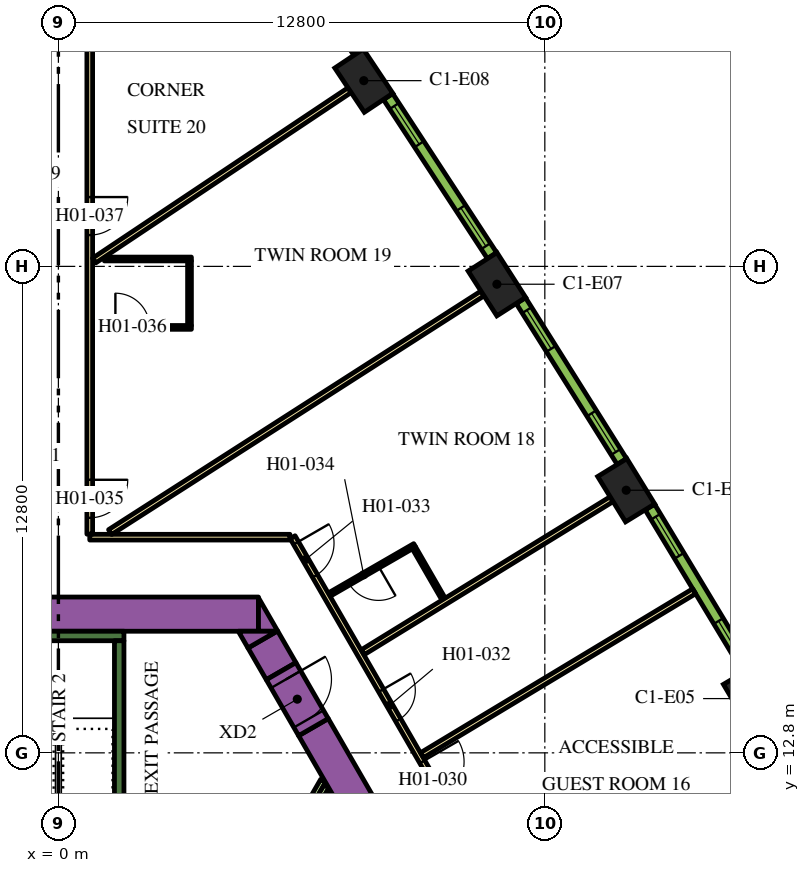
"""IFC4 building model, lengths in metres.
Left out: names, types, materials, properties, quantities, classifications, styles, units other than length and angle.
Written with IfcOpenShell. Run it as: python <this file> out.ifc"""

import sys

from ifc_helpers import new_model, si_unit, direction, frame, frame_2d, origin, origin_2d, place, context, subcontext, project, spatial, polyline, rectangle, outline, extrude, element, fill, save


model = new_model("IFC4")
c1 = context("Model", 3, precision=1e-05, world=origin(), true_north=direction((0.0, 1.0)))
c2 = subcontext(c1, "Body", "Model", "MODEL_VIEW")
j1 = project(units=[si_unit("LENGTHUNIT", "METRE"), si_unit("PLANEANGLEUNIT", "RADIAN")], contexts=[c1])
p1 = place(None, origin())
s1 = spatial("IfcSite", under=j1, at=p1, CompositionType="ELEMENT")
p2 = place(p1, origin())
s2 = spatial("IfcBuilding", under=s1, at=p2, CompositionType="ELEMENT")
p3 = place(p2, frame((0.0, 0.0, 31.5)))
s3 = spatial("IfcBuildingStorey", under=s2, at=p3, CompositionType="ELEMENT", Elevation=31.5)
for number, where, z_axis, x_axis in (
    (1, (18.243, 14.228, 0.0), (0.0, 0.0, 1.0), (-0.508, 0.861, 0.0)),
    (2, (14.942, 19.71, 0.0), (0.0, 0.0, 1.0), (-0.524, 0.852, 0.0)),
    (3, (11.539, 25.131, 0.0), (0.0, 0.0, 1.0), (-0.539, 0.842, 0.0)),
    (4, (8.037, 30.487, 0.0), (0.0, 0.0, 1.0), (-0.555, 0.832, 0.0)),
):
    element("IfcColumn", number, at=place(p3, frame(where, z_axis=z_axis, x_axis=x_axis)), inside=s3, PredefinedType="COLUMN", context=c2, shape_type="SweptSolid", body=[
        extrude(rectangle(XDim=1.4, YDim=0.9, at=origin_2d()), origin(), (0.0, 0.0, 1.0), 3.9),
    ])
p4 = place(p3, frame((6.711, 13.476, 0.0), z_axis=(0.0, 0.0, 1.0), x_axis=(0.500002723396, -0.866023831425, 0.0)))
e5 = element("IfcWall", 5, at=p4, inside=s3, PredefinedType="SOLIDWALL", context=c2, shape_type="SweptSolid", body=[
    extrude(rectangle(XDim=20.334, YDim=0.9, at=frame_2d((10.167, 0.0))), origin(), (0.0, 0.0, 1.0), 3.9),
])
p5 = place(p3, frame((-4.224, 16.45, 0.0), z_axis=(0.0, 0.0, 1.0), x_axis=(1.0, 0.0, 0.0)))
e6 = element("IfcWall", 6, at=p5, inside=s3, PredefinedType="SOLIDWALL", context=c2, shape_type="SweptSolid", body=[
    extrude(rectangle(XDim=9.488, YDim=0.9, at=frame_2d((4.744, 0.0))), origin(), (0.0, 0.0, 1.0), 3.9),
])
p6 = place(p3, origin())
e7 = element("IfcWall", 7, at=p6, inside=s3, PredefinedType="SOLIDWALL", context=c2, shape_type="SweptSolid", body=[
    extrude(outline(polyline([(5.265, 16.0), (5.265, 16.88), (5.773, 16.0), (5.265, 16.0)])), origin(), (0.0, 0.0, 1.0), 3.9),
])
p7 = place(p3, frame((5.861, 14.949, 0.0), z_axis=(0.0, 0.0, 1.0), x_axis=(-0.50011719232, 0.865957732194, 0.0)))
e8 = element("IfcWall", 8, at=p7, inside=s3, PredefinedType="SOLIDWALL", context=c2, shape_type="SweptSolid", body=[
    extrude(rectangle(XDim=0.964, YDim=0.9, at=frame_2d((0.482, 0.0))), origin(), (0.0, 0.0, 1.0), 3.9),
])
e9 = element("IfcWall", 9, at=p6, inside=s3, PredefinedType="SOLIDWALL", context=c2, shape_type="SweptSolid", body=[
    extrude(outline(polyline([(4.734, 16.0), (5.75, 16.0), (4.988, 15.56), (4.734, 16.0)])), origin(), (0.0, 0.0, 1.0), 3.9),
])
p8 = place(p3, frame((-1.725, 15.875, 0.0), z_axis=(0.0, 0.0, 1.0), x_axis=(1.0, 0.0, 0.0)))
e10 = element("IfcWall", 10, at=p8, inside=s3, PredefinedType="SOLIDWALL", context=c2, shape_type="SweptSolid", body=[
    extrude(rectangle(XDim=3.45, YDim=0.25, at=frame_2d((1.725, 0.0))), origin(), (0.0, 0.0, 1.0), 3.9),
])
p9 = place(p3, frame((1.6, 8.95, 0.0), z_axis=(0.0, 0.0, 1.0), x_axis=(0.0, 1.0, 0.0)))
e11 = element("IfcWall", 11, at=p9, inside=s3, PredefinedType="SOLIDWALL", context=c2, shape_type="SweptSolid", body=[
    extrude(rectangle(XDim=6.8, YDim=0.25, at=frame_2d((3.4, 0.0))), origin(), (0.0, 0.0, 1.0), 3.9),
])
p10 = place(p3, frame((6.482, 11.225, 0.0), z_axis=(0.0, 0.0, 1.0), x_axis=(0.5001061818, 0.865964091014, 0.0)))
e12 = element("IfcWall", 12, at=p10, inside=s3, PredefinedType="PARTITIONING", context=c2, shape_type="SweptSolid", body=[
    extrude(rectangle(XDim=0.973, YDim=0.15, at=frame_2d((0.486, 0.0))), origin(), (0.0, 0.0, 1.0), 2.75),
])
p11 = place(p3, frame((6.742, 11.375, 0.0), z_axis=(0.0, 0.0, 1.0), x_axis=(0.499744951064, 0.86617260629, 0.0)))
e13 = element("IfcWall", 13, at=p11, inside=s3, PredefinedType="PARTITIONING", context=c2, shape_type="SweptSolid", body=[
    extrude(rectangle(XDim=0.626, YDim=0.15, at=frame_2d((0.313, 0.0))), origin(), (0.0, 0.0, 1.0), 2.75),
])
p12 = place(p3, frame((7.001, 11.525, 0.0), z_axis=(0.0, 0.0, 1.0), x_axis=(0.499797962495, 0.866142018774, 0.0)))
e14 = element("IfcWall", 14, at=p12, inside=s3, PredefinedType="PARTITIONING", context=c2, shape_type="SweptSolid", body=[
    extrude(rectangle(XDim=0.28, YDim=0.15, at=frame_2d((0.14, 0.0))), origin(), (0.0, 0.0, 1.0), 2.75),
])
p13 = place(p3, frame((5.861, 14.948, 0.0), z_axis=(0.0, 0.0, 1.0), x_axis=(0.500062241894, -0.865989465428, 0.0)))
e15 = element("IfcWall", 15, at=p13, inside=s3, PredefinedType="SOLIDWALL", context=c2, shape_type="SweptSolid", body=[
    extrude(rectangle(XDim=1.7, YDim=0.9, at=frame_2d((0.85, 0.0))), origin(), (0.0, 0.0, 1.0), 3.9),
])
p14 = place(p13, frame((0.25, 0.0, 0.0)))
e16 = element("IfcOpeningElement", 16, at=p14, cuts=e15, PredefinedType="OPENING", context=c2, shape_type="SweptSolid", body=[
    extrude(rectangle(XDim=1.2, YDim=2.1, at=frame_2d((0.6, 1.05))), frame((0.0, 0.46, 0.0), z_axis=(0.0, -1.0, 0.0), x_axis=(1.0, 0.0, 0.0)), (0.0, 0.0, 1.0), 0.92),
])
p15 = place(p3, frame((6.163, 18.475, 0.0), z_axis=(0.0, 0.0, 1.0), x_axis=(0.500001317485, -0.866024643133, 0.0)))
e17 = element("IfcWall", 17, at=p15, inside=s3, PredefinedType="PARTITIONING", context=c2, shape_type="SweptSolid", body=[
    extrude(rectangle(XDim=25.767, YDim=0.15, at=frame_2d((12.883, 0.0))), origin(), (0.0, 0.0, 1.0), 2.75),
])
p16 = place(p15, frame((24.586, 0.0, 0.0)))
e18 = element("IfcOpeningElement", 18, at=p16, cuts=e17, PredefinedType="OPENING", context=c2, shape_type="SweptSolid", body=[
    extrude(rectangle(XDim=1.0, YDim=2.1, at=frame_2d((0.5, 1.05))), frame((0.0, 0.085, 0.0), z_axis=(0.0, -1.0, 0.0), x_axis=(1.0, 0.0, 0.0)), (0.0, 0.0, 1.0), 0.17),
])
p17 = place(p15, frame((19.319, 0.0, 0.0)))
e19 = element("IfcOpeningElement", 19, at=p17, cuts=e17, PredefinedType="OPENING", context=c2, shape_type="SweptSolid", body=[
    extrude(rectangle(XDim=1.0, YDim=2.1, at=frame_2d((0.5, 1.05))), frame((0.0, 0.085, 0.0), z_axis=(0.0, -1.0, 0.0), x_axis=(1.0, 0.0, 0.0)), (0.0, 0.0, 1.0), 0.17),
])
p18 = place(p15, frame((18.012, 0.0, 0.0)))
e20 = element("IfcOpeningElement", 20, at=p18, cuts=e17, PredefinedType="OPENING", context=c2, shape_type="SweptSolid", body=[
    extrude(rectangle(XDim=1.0, YDim=2.1, at=frame_2d((0.5, 1.05))), frame((0.0, 0.085, 0.0), z_axis=(0.0, -1.0, 0.0), x_axis=(1.0, 0.0, 0.0)), (0.0, 0.0, 1.0), 0.17),
])
p19 = place(p15, frame((6.824, 0.0, 0.0)))
e21 = element("IfcOpeningElement", 21, at=p19, cuts=e17, PredefinedType="OPENING", context=c2, shape_type="SweptSolid", body=[
    extrude(rectangle(XDim=1.1, YDim=2.1, at=frame_2d((0.55, 1.05))), frame((0.0, 0.085, 0.0), z_axis=(0.0, -1.0, 0.0), x_axis=(1.0, 0.0, 0.0)), (0.0, 0.0, 1.0), 0.17),
])
p20 = place(p15, frame((4.658, 0.0, 0.0)))
e22 = element("IfcOpeningElement", 22, at=p20, cuts=e17, PredefinedType="OPENING", context=c2, shape_type="SweptSolid", body=[
    extrude(rectangle(XDim=0.9, YDim=2.1, at=frame_2d((0.45, 1.05))), frame((0.0, 0.085, 0.0), z_axis=(0.0, -1.0, 0.0), x_axis=(1.0, 0.0, 0.0)), (0.0, 0.0, 1.0), 0.17),
])
p21 = place(p15, frame((0.18, 0.0, 0.0)))
e23 = element("IfcOpeningElement", 23, at=p21, cuts=e17, PredefinedType="OPENING", context=c2, shape_type="SweptSolid", body=[
    extrude(rectangle(XDim=1.0, YDim=2.1, at=frame_2d((0.5, 1.05))), frame((0.0, 0.085, 0.0), z_axis=(0.0, -1.0, 0.0), x_axis=(1.0, 0.0, 0.0)), (0.0, 0.0, 1.0), 0.17),
])
p22 = place(p3, frame((0.825, 18.475, 0.0), z_axis=(0.0, 0.0, 1.0), x_axis=(1.0, 0.0, 0.0)))
e24 = element("IfcWall", 24, at=p22, inside=s3, PredefinedType="PARTITIONING", context=c2, shape_type="SweptSolid", body=[
    extrude(rectangle(XDim=5.268, YDim=0.15, at=frame_2d((2.634, 0.0))), origin(), (0.0, 0.0, 1.0), 2.75),
])
p23 = place(p3, frame((0.825, 34.699, 0.0), z_axis=(0.0, 0.0, 1.0), x_axis=(0.0, -1.0, 0.0)))
e25 = element("IfcWall", 25, at=p23, inside=s3, PredefinedType="PARTITIONING", context=c2, shape_type="SweptSolid", body=[
    extrude(rectangle(XDim=16.144, YDim=0.15, at=frame_2d((8.072, 0.0))), origin(), (0.0, 0.0, 1.0), 2.75),
])
p24 = place(p23, frame((14.714, 0.0, 0.0)))
e26 = element("IfcOpeningElement", 26, at=p24, cuts=e25, PredefinedType="OPENING", context=c2, shape_type="SweptSolid", body=[
    extrude(rectangle(XDim=1.0, YDim=2.1, at=frame_2d((0.5, 1.05))), frame((0.0, 0.085, 0.0), z_axis=(0.0, -1.0, 0.0), x_axis=(1.0, 0.0, 0.0)), (0.0, 0.0, 1.0), 0.17),
])
p25 = place(p23, frame((7.275, 0.0, 0.0)))
e27 = element("IfcOpeningElement", 27, at=p25, cuts=e25, PredefinedType="OPENING", context=c2, shape_type="SweptSolid", body=[
    extrude(rectangle(XDim=1.0, YDim=2.1, at=frame_2d((0.5, 1.05))), frame((0.0, 0.085, 0.0), z_axis=(0.0, -1.0, 0.0), x_axis=(1.0, 0.0, 0.0)), (0.0, 0.0, 1.0), 0.17),
])
p26 = place(p3, frame((7.662, 30.238, 0.0), z_axis=(0.0, 0.0, 1.0), x_axis=(-0.831882886825, -0.554951225431, 0.0)))
e28 = element("IfcWall", 28, at=p26, inside=s3, PredefinedType="PARTITIONING", context=c2, shape_type="SweptSolid", body=[
    extrude(rectangle(XDim=8.079, YDim=0.15, at=frame_2d((4.04, 0.0))), origin(), (0.0, 0.0, 1.0), 2.75),
])
p27 = place(p3, frame((11.16, 24.888, 0.0), z_axis=(0.0, 0.0, 1.0), x_axis=(-0.84199813156, -0.539480441211, 0.0)))
e29 = element("IfcWall", 29, at=p27, inside=s3, PredefinedType="PARTITIONING", context=c2, shape_type="SweptSolid", body=[
    extrude(rectangle(XDim=11.638, YDim=0.15, at=frame_2d((5.819, 0.0))), origin(), (0.0, 0.0, 1.0), 2.75),
])
p28 = place(p3, frame((14.558, 19.475, 0.0), z_axis=(0.0, 0.0, 1.0), x_axis=(-0.851829455142, -0.523819223925, 0.0)))
e30 = element("IfcWall", 30, at=p28, inside=s3, PredefinedType="PARTITIONING", context=c2, shape_type="SweptSolid", body=[
    extrude(rectangle(XDim=7.688, YDim=0.15, at=frame_2d((3.844, 0.0))), origin(), (0.0, 0.0, 1.0), 2.75),
])
p29 = place(p3, frame((16.729, 17.052, 0.0), z_axis=(0.0, 0.0, 1.0), x_axis=(-0.856630606266, -0.515930232113, 0.0)))
e31 = element("IfcWall", 31, at=p29, inside=s3, PredefinedType="PARTITIONING", context=c2, shape_type="SweptSolid", body=[
    extrude(rectangle(XDim=8.355, YDim=0.15, at=frame_2d((4.178, 0.0))), origin(), (0.0, 0.0, 1.0), 2.75),
])
p30 = place(p3, frame((9.375, 18.261, 0.0), z_axis=(0.0, 0.0, 1.0), x_axis=(-0.866021400173, -0.500006934395, 0.0)))
e32 = element("IfcWall", 32, at=p30, inside=s3, PredefinedType="PARTITIONING", context=c2, shape_type="SweptSolid", body=[
    extrude(rectangle(XDim=2.6, YDim=0.1, at=frame_2d((1.3, 0.0))), origin(), (0.0, 0.0, 1.0), 2.75),
])
p31 = place(p30, frame((1.1, 0.0, 0.0)))
e33 = element("IfcOpeningElement", 33, at=p31, cuts=e32, PredefinedType="OPENING", context=c2, shape_type="SweptSolid", body=[
    extrude(rectangle(XDim=0.9, YDim=2.1, at=frame_2d((0.45, 1.05))), frame((0.0, 0.06, 0.0), z_axis=(0.0, -1.0, 0.0), x_axis=(1.0, 0.0, 0.0)), (0.0, 0.0, 1.0), 0.12),
])
p32 = place(p3, frame((9.357, 18.193, 0.0), z_axis=(0.0, 0.0, 1.0), x_axis=(0.499899694197, -0.866083307622, 0.0)))
e34 = element("IfcWall", 34, at=p32, inside=s3, PredefinedType="PARTITIONING", context=c2, shape_type="SweptSolid", body=[
    extrude(rectangle(XDim=1.55, YDim=0.1, at=frame_2d((0.775, 0.0))), origin(), (0.0, 0.0, 1.0), 2.75),
])
p33 = place(p3, frame((0.9, 23.994, 0.0), z_axis=(0.0, 0.0, 1.0), x_axis=(1.0, 0.0, 0.0)))
e35 = element("IfcWall", 35, at=p33, inside=s3, PredefinedType="PARTITIONING", context=c2, shape_type="SweptSolid", body=[
    extrude(rectangle(XDim=2.6, YDim=0.1, at=frame_2d((1.3, 0.0))), origin(), (0.0, 0.0, 1.0), 2.75),
])
p34 = place(p33, frame((0.6, 0.0, 0.0)))
e36 = element("IfcOpeningElement", 36, at=p34, cuts=e35, PredefinedType="OPENING", context=c2, shape_type="SweptSolid", body=[
    extrude(rectangle(XDim=0.9, YDim=2.1, at=frame_2d((0.45, 1.05))), frame((0.0, 0.06, 0.0), z_axis=(0.0, -1.0, 0.0), x_axis=(1.0, 0.0, 0.0)), (0.0, 0.0, 1.0), 0.12),
])
p35 = place(p3, frame((3.45, 24.044, 0.0), z_axis=(0.0, 0.0, 1.0), x_axis=(0.0, 1.0, 0.0)))
e37 = element("IfcWall", 37, at=p35, inside=s3, PredefinedType="PARTITIONING", context=c2, shape_type="SweptSolid", body=[
    extrude(rectangle(XDim=1.7, YDim=0.1, at=frame_2d((0.85, 0.0))), origin(), (0.0, 0.0, 1.0), 2.75),
])
p36 = place(p3, frame((1.21, 25.794, 0.0), z_axis=(0.0, 0.0, 1.0), x_axis=(1.0, 0.0, 0.0)))
e38 = element("IfcWall", 38, at=p36, inside=s3, PredefinedType="PARTITIONING", context=c2, shape_type="SweptSolid", body=[
    extrude(rectangle(XDim=2.29, YDim=0.1, at=frame_2d((1.145, 0.0))), origin(), (0.0, 0.0, 1.0), 2.75),
])
p37 = place(p3, frame((18.143, 14.986, 0.0), z_axis=(0.0, 0.0, 1.0), x_axis=(-0.515938796285, 0.856625448191, 0.0)))
e39 = element("IfcWall", 39, at=p37, inside=s3, PredefinedType="SOLIDWALL", context=c2, shape_type="SweptSolid", body=[
    extrude(rectangle(XDim=4.998, YDim=0.29, at=frame_2d((2.499, 0.0))), origin(), (0.0, 0.0, 1.0), 3.65),
])
p38 = place(p37, frame((0.297, 0.0, 0.9)))
e40 = element("IfcOpeningElement", 40, at=p38, cuts=e39, PredefinedType="OPENING", context=c2, shape_type="SweptSolid", body=[
    extrude(rectangle(XDim=1.2, YDim=2.15, at=frame_2d((0.6, 1.075))), frame((0.0, 0.155, 0.0), z_axis=(0.0, -1.0, 0.0), x_axis=(1.0, 0.0, 0.0)), (0.0, 0.0, 1.0), 0.31),
])
p39 = place(p37, frame((3.501, 0.0, 0.9)))
e41 = element("IfcOpeningElement", 41, at=p39, cuts=e39, PredefinedType="OPENING", context=c2, shape_type="SweptSolid", body=[
    extrude(rectangle(XDim=1.2, YDim=2.15, at=frame_2d((0.6, 1.075))), frame((0.0, 0.155, 0.0), z_axis=(0.0, -1.0, 0.0), x_axis=(1.0, 0.0, 0.0)), (0.0, 0.0, 1.0), 0.31),
])
p40 = place(p3, frame((14.827, 20.466, 0.0), z_axis=(0.0, 0.0, 1.0), x_axis=(-0.531688286542, 0.846940119462, 0.0)))
e42 = element("IfcWall", 42, at=p40, inside=s3, PredefinedType="SOLIDWALL", context=c2, shape_type="SweptSolid", body=[
    extrude(rectangle(XDim=4.998, YDim=0.29, at=frame_2d((2.499, 0.0))), origin(), (0.0, 0.0, 1.0), 3.65),
])
p41 = place(p40, frame((0.297, 0.0, 0.9)))
e43 = element("IfcOpeningElement", 43, at=p41, cuts=e42, PredefinedType="OPENING", context=c2, shape_type="SweptSolid", body=[
    extrude(rectangle(XDim=1.2, YDim=2.15, at=frame_2d((0.6, 1.075))), frame((0.0, 0.155, 0.0), z_axis=(0.0, -1.0, 0.0), x_axis=(1.0, 0.0, 0.0)), (0.0, 0.0, 1.0), 0.31),
])
p42 = place(p40, frame((3.501, 0.0, 0.9)))
e44 = element("IfcOpeningElement", 44, at=p42, cuts=e42, PredefinedType="OPENING", context=c2, shape_type="SweptSolid", body=[
    extrude(rectangle(XDim=1.2, YDim=2.15, at=frame_2d((0.6, 1.075))), frame((0.0, 0.155, 0.0), z_axis=(0.0, -1.0, 0.0), x_axis=(1.0, 0.0, 0.0)), (0.0, 0.0, 1.0), 0.31),
])
p43 = place(p3, frame((11.411, 25.884, 0.0), z_axis=(0.0, 0.0, 1.0), x_axis=(-0.547204617628, 0.836998868845, 0.0)))
e45 = element("IfcWall", 45, at=p43, inside=s3, PredefinedType="SOLIDWALL", context=c2, shape_type="SweptSolid", body=[
    extrude(rectangle(XDim=4.998, YDim=0.29, at=frame_2d((2.499, 0.0))), origin(), (0.0, 0.0, 1.0), 3.65),
])
p44 = place(p43, frame((0.297, 0.0, 0.9)))
e46 = element("IfcOpeningElement", 46, at=p44, cuts=e45, PredefinedType="OPENING", context=c2, shape_type="SweptSolid", body=[
    extrude(rectangle(XDim=1.2, YDim=2.15, at=frame_2d((0.6, 1.075))), frame((0.0, 0.155, 0.0), z_axis=(0.0, -1.0, 0.0), x_axis=(1.0, 0.0, 0.0)), (0.0, 0.0, 1.0), 0.31),
])
p45 = place(p43, frame((3.501, 0.0, 0.9)))
e47 = element("IfcOpeningElement", 47, at=p45, cuts=e45, PredefinedType="OPENING", context=c2, shape_type="SweptSolid", body=[
    extrude(rectangle(XDim=1.2, YDim=2.15, at=frame_2d((0.6, 1.075))), frame((0.0, 0.155, 0.0), z_axis=(0.0, -1.0, 0.0), x_axis=(1.0, 0.0, 0.0)), (0.0, 0.0, 1.0), 0.31),
])
p46 = place(p3, frame((7.895, 31.238, 0.0), z_axis=(0.0, 0.0, 1.0), x_axis=(-0.562610153679, 0.826722332454, 0.0)))
e48 = element("IfcWall", 48, at=p46, inside=s3, PredefinedType="SOLIDWALL", context=c2, shape_type="SweptSolid", body=[
    extrude(rectangle(XDim=5.006, YDim=0.29, at=frame_2d((2.503, 0.0))), origin(), (0.0, 0.0, 1.0), 3.65),
])
p47 = place(p46, frame((0.31, 0.0, 0.9)))
e49 = element("IfcOpeningElement", 49, at=p47, cuts=e48, PredefinedType="OPENING", context=c2, shape_type="SweptSolid", body=[
    extrude(rectangle(XDim=1.2, YDim=2.15, at=frame_2d((0.6, 1.075))), frame((0.0, 0.155, 0.0), z_axis=(0.0, -1.0, 0.0), x_axis=(1.0, 0.0, 0.0)), (0.0, 0.0, 1.0), 0.31),
])
p48 = place(p46, frame((3.541, 0.0, 0.9)))
e50 = element("IfcOpeningElement", 50, at=p48, cuts=e48, PredefinedType="OPENING", context=c2, shape_type="SweptSolid", body=[
    extrude(rectangle(XDim=1.2, YDim=2.15, at=frame_2d((0.6, 1.075))), frame((0.0, 0.155, 0.0), z_axis=(0.0, -1.0, 0.0), x_axis=(1.0, 0.0, 0.0)), (0.0, 0.0, 1.0), 0.31),
])
p49 = place(p14, origin())
e51 = element("IfcDoor", 51, at=p49, inside=s3, OperationType="SINGLE_SWING_LEFT", PredefinedType="DOOR", context=c2, shape_type="SweptSolid", body=[
    extrude(rectangle(XDim=1.2, YDim=2.1, at=frame_2d((0.6, 1.05))), frame((0.0, 0.025, 0.0), z_axis=(0.0, -1.0, 0.0), x_axis=(1.0, 0.0, 0.0)), (0.0, 0.0, 1.0), 0.05),
])
fill(e16, e51)
p50 = place(p19, origin())
e52 = element("IfcDoor", 52, at=p50, inside=s3, OperationType="SINGLE_SWING_LEFT", PredefinedType="DOOR", context=c2, shape_type="SweptSolid", body=[
    extrude(rectangle(XDim=1.1, YDim=2.1, at=frame_2d((0.55, 1.05))), frame((0.0, 0.025, 0.0), z_axis=(0.0, -1.0, 0.0), x_axis=(1.0, 0.0, 0.0)), (0.0, 0.0, 1.0), 0.05),
])
fill(e21, e52)
p51 = place(p20, origin())
e53 = element("IfcDoor", 53, at=p51, inside=s3, OperationType="SINGLE_SWING_LEFT", PredefinedType="DOOR", context=c2, shape_type="SweptSolid", body=[
    extrude(rectangle(XDim=0.9, YDim=2.1, at=frame_2d((0.45, 1.05))), frame((0.0, 0.025, 0.0), z_axis=(0.0, -1.0, 0.0), x_axis=(1.0, 0.0, 0.0)), (0.0, 0.0, 1.0), 0.05),
])
fill(e22, e53)
p52 = place(p21, origin())
e54 = element("IfcDoor", 54, at=p52, inside=s3, OperationType="SINGLE_SWING_LEFT", PredefinedType="DOOR", context=c2, shape_type="SweptSolid", body=[
    extrude(rectangle(XDim=1.0, YDim=2.1, at=frame_2d((0.5, 1.05))), frame((0.0, 0.025, 0.0), z_axis=(0.0, -1.0, 0.0), x_axis=(1.0, 0.0, 0.0)), (0.0, 0.0, 1.0), 0.05),
])
fill(e23, e54)
p53 = place(p31, origin())
e55 = element("IfcDoor", 55, at=p53, inside=s3, OperationType="SINGLE_SWING_RIGHT", PredefinedType="DOOR", context=c2, shape_type="SweptSolid", body=[
    extrude(rectangle(XDim=0.9, YDim=2.1, at=frame_2d((0.45, 1.05))), frame((0.0, 0.025, 0.0), z_axis=(0.0, -1.0, 0.0), x_axis=(1.0, 0.0, 0.0)), (0.0, 0.0, 1.0), 0.05),
])
fill(e33, e55)
p54 = place(p24, origin())
e56 = element("IfcDoor", 56, at=p54, inside=s3, OperationType="SINGLE_SWING_RIGHT", PredefinedType="DOOR", context=c2, shape_type="SweptSolid", body=[
    extrude(rectangle(XDim=1.0, YDim=2.1, at=frame_2d((0.5, 1.05))), frame((0.0, 0.025, 0.0), z_axis=(0.0, -1.0, 0.0), x_axis=(1.0, 0.0, 0.0)), (0.0, 0.0, 1.0), 0.05),
])
fill(e26, e56)
p55 = place(p34, origin())
e57 = element("IfcDoor", 57, at=p55, inside=s3, OperationType="SINGLE_SWING_LEFT", PredefinedType="DOOR", context=c2, shape_type="SweptSolid", body=[
    extrude(rectangle(XDim=0.9, YDim=2.1, at=frame_2d((0.45, 1.05))), frame((0.0, 0.025, 0.0), z_axis=(0.0, -1.0, 0.0), x_axis=(1.0, 0.0, 0.0)), (0.0, 0.0, 1.0), 0.05),
])
fill(e36, e57)
p56 = place(p25, origin())
e58 = element("IfcDoor", 58, at=p56, inside=s3, OperationType="SINGLE_SWING_RIGHT", PredefinedType="DOOR", context=c2, shape_type="SweptSolid", body=[
    extrude(rectangle(XDim=1.0, YDim=2.1, at=frame_2d((0.5, 1.05))), frame((0.0, 0.025, 0.0), z_axis=(0.0, -1.0, 0.0), x_axis=(1.0, 0.0, 0.0)), (0.0, 0.0, 1.0), 0.05),
])
fill(e27, e58)
p57 = place(p38, origin())
e59 = element("IfcWindow", 59, at=p57, inside=s3, PartitioningType="DOUBLE_PANEL_VERTICAL", PredefinedType="WINDOW", context=c2, shape_type="SweptSolid", body=[
    extrude(rectangle(XDim=1.2, YDim=2.15, at=frame_2d((0.6, 1.075))), frame((0.0, 0.015, 0.0), z_axis=(0.0, -1.0, 0.0), x_axis=(1.0, 0.0, 0.0)), (0.0, 0.0, 1.0), 0.06),
])
fill(e40, e59)
p58 = place(p39, origin())
e60 = element("IfcWindow", 60, at=p58, inside=s3, PartitioningType="DOUBLE_PANEL_VERTICAL", PredefinedType="WINDOW", context=c2, shape_type="SweptSolid", body=[
    extrude(rectangle(XDim=1.2, YDim=2.15, at=frame_2d((0.6, 1.075))), frame((0.0, 0.015, 0.0), z_axis=(0.0, -1.0, 0.0), x_axis=(1.0, 0.0, 0.0)), (0.0, 0.0, 1.0), 0.06),
])
fill(e41, e60)
p59 = place(p41, origin())
e61 = element("IfcWindow", 61, at=p59, inside=s3, PartitioningType="DOUBLE_PANEL_VERTICAL", PredefinedType="WINDOW", context=c2, shape_type="SweptSolid", body=[
    extrude(rectangle(XDim=1.2, YDim=2.15, at=frame_2d((0.6, 1.075))), frame((0.0, 0.015, 0.0), z_axis=(0.0, -1.0, 0.0), x_axis=(1.0, 0.0, 0.0)), (0.0, 0.0, 1.0), 0.06),
])
fill(e43, e61)
p60 = place(p42, origin())
e62 = element("IfcWindow", 62, at=p60, inside=s3, PartitioningType="DOUBLE_PANEL_VERTICAL", PredefinedType="WINDOW", context=c2, shape_type="SweptSolid", body=[
    extrude(rectangle(XDim=1.2, YDim=2.15, at=frame_2d((0.6, 1.075))), frame((0.0, 0.015, 0.0), z_axis=(0.0, -1.0, 0.0), x_axis=(1.0, 0.0, 0.0)), (0.0, 0.0, 1.0), 0.06),
])
fill(e44, e62)
p61 = place(p44, origin())
e63 = element("IfcWindow", 63, at=p61, inside=s3, PartitioningType="DOUBLE_PANEL_VERTICAL", PredefinedType="WINDOW", context=c2, shape_type="SweptSolid", body=[
    extrude(rectangle(XDim=1.2, YDim=2.15, at=frame_2d((0.6, 1.075))), frame((0.0, 0.015, 0.0), z_axis=(0.0, -1.0, 0.0), x_axis=(1.0, 0.0, 0.0)), (0.0, 0.0, 1.0), 0.06),
])
fill(e46, e63)
p62 = place(p45, origin())
e64 = element("IfcWindow", 64, at=p62, inside=s3, PartitioningType="DOUBLE_PANEL_VERTICAL", PredefinedType="WINDOW", context=c2, shape_type="SweptSolid", body=[
    extrude(rectangle(XDim=1.2, YDim=2.15, at=frame_2d((0.6, 1.075))), frame((0.0, 0.015, 0.0), z_axis=(0.0, -1.0, 0.0), x_axis=(1.0, 0.0, 0.0)), (0.0, 0.0, 1.0), 0.06),
])
fill(e47, e64)
save(model, sys.argv[1])
